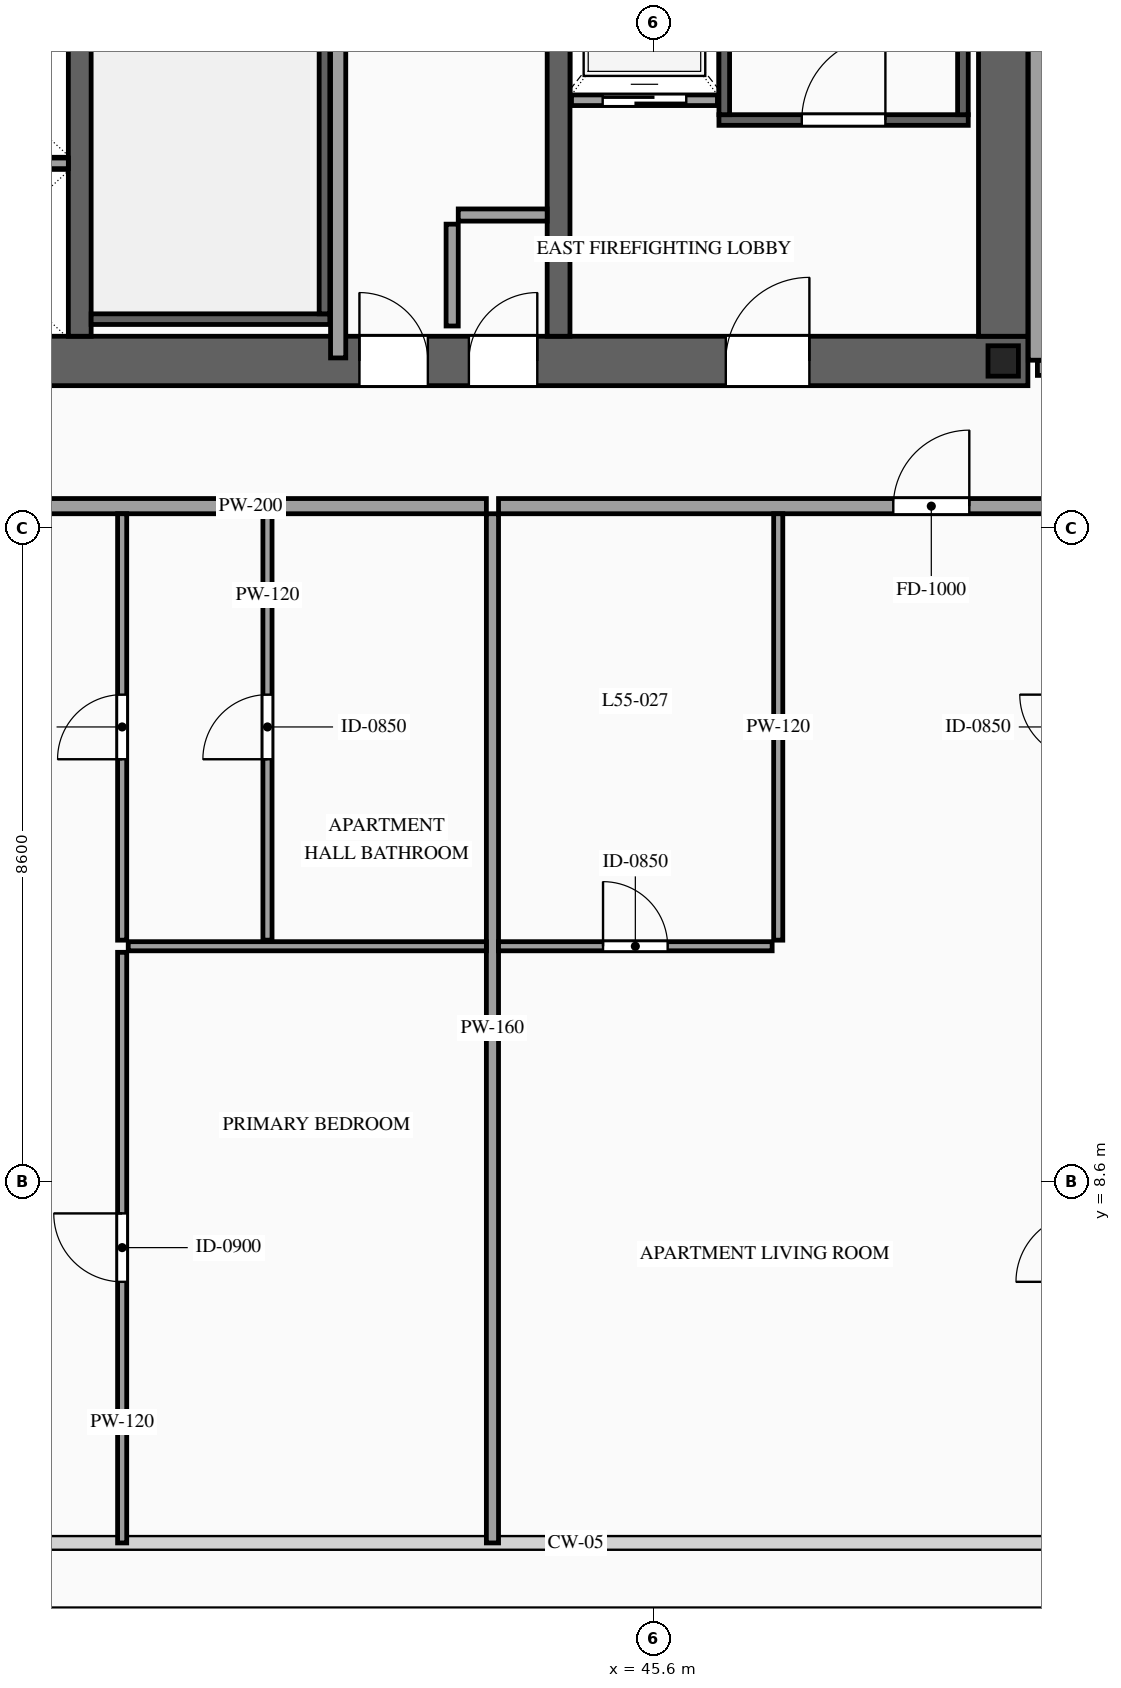
"""IFC4 building model, lengths in metres.
Left out: names, types, materials, properties, quantities, classifications, styles, units other than length and angle.
Written with IfcOpenShell. Run it as: python <this file> out.ifc"""

import sys

from ifc_helpers import new_model, si_unit, direction, frame, frame_2d, origin, origin_2d, place, context, subcontext, project, spatial, rectangle, i_section, extrude, source, transform, mapped, element, fill, save


model = new_model("IFC4")
c1 = context("Model", 3, precision=1e-05, world=origin(), true_north=direction((0.0, 1.0)))
c2 = subcontext(c1, "Body", "Model", "MODEL_VIEW")
j1 = project(units=[si_unit("LENGTHUNIT", "METRE"), si_unit("PLANEANGLEUNIT", "RADIAN")], contexts=[c1])
p1 = place(None, origin())
s1 = spatial("IfcSite", under=j1, at=p1, CompositionType="ELEMENT")
p2 = place(p1, origin())
s2 = spatial("IfcBuilding", under=s1, at=p2, CompositionType="ELEMENT")
p3 = place(p2, frame((0.0, 0.0, 209.0)))
s3 = spatial("IfcBuildingStorey", under=s2, at=p3, CompositionType="ELEMENT", Elevation=209.0)
p4 = place(p3, frame((23.475, 19.4, 0.0), z_axis=(0.0, 0.0, 1.0), x_axis=(1.0, 0.0, 0.0)))
e1 = element("IfcWall", 1, at=p4, inside=s3, PredefinedType="SHEAR", context=c2, shape_type="SweptSolid", body=[
    extrude(rectangle(XDim=27.05, YDim=0.65, at=frame_2d((13.525, 0.0))), origin(), (0.0, 0.0, 1.0), 3.5),
])
p5 = place(p4, frame((1.975, 0.0, 0.0)))
e2 = element("IfcOpeningElement", 2, at=p5, cuts=e1, PredefinedType="OPENING", context=c2, shape_type="SweptSolid", body=[
    extrude(rectangle(XDim=1.1, YDim=2.2, at=frame_2d((0.55, 1.1))), frame((0.0, 0.34, 0.0), z_axis=(0.0, -1.0, 0.0), x_axis=(1.0, 0.0, 0.0)), (0.0, 0.0, 1.0), 0.68),
])
p6 = place(p4, frame((9.875, 0.0, 0.0)))
e3 = element("IfcOpeningElement", 3, at=p6, cuts=e1, PredefinedType="OPENING", context=c2, shape_type="SweptSolid", body=[
    extrude(rectangle(XDim=1.1, YDim=2.2, at=frame_2d((0.55, 1.1))), frame((0.0, 0.34, 0.0), z_axis=(0.0, -1.0, 0.0), x_axis=(1.0, 0.0, 0.0)), (0.0, 0.0, 1.0), 0.68),
])
p7 = place(p4, frame((23.075, 0.0, 0.0)))
e4 = element("IfcOpeningElement", 4, at=p7, cuts=e1, PredefinedType="OPENING", context=c2, shape_type="SweptSolid", body=[
    extrude(rectangle(XDim=1.1, YDim=2.2, at=frame_2d((0.55, 1.1))), frame((0.0, 0.34, 0.0), z_axis=(0.0, -1.0, 0.0), x_axis=(1.0, 0.0, 0.0)), (0.0, 0.0, 1.0), 0.68),
])
p8 = place(p4, frame((19.695, 0.0, 0.0)))
e5 = element("IfcOpeningElement", 5, at=p8, cuts=e1, PredefinedType="OPENING", context=c2, shape_type="SweptSolid", body=[
    extrude(rectangle(XDim=0.9, YDim=2.15, at=frame_2d((0.45, 1.075))), frame((0.0, 0.34, 0.0), z_axis=(0.0, -1.0, 0.0), x_axis=(1.0, 0.0, 0.0)), (0.0, 0.0, 1.0), 0.68),
])
p9 = place(p4, frame((18.255, 0.0, 0.0)))
e6 = element("IfcOpeningElement", 6, at=p9, cuts=e1, PredefinedType="OPENING", context=c2, shape_type="SweptSolid", body=[
    extrude(rectangle(XDim=0.9, YDim=2.15, at=frame_2d((0.45, 1.075))), frame((0.0, 0.34, 0.0), z_axis=(0.0, -1.0, 0.0), x_axis=(1.0, 0.0, 0.0)), (0.0, 0.0, 1.0), 0.68),
])
m1 = source(origin(), c2, "Body", "SweptSolid", [
    extrude(rectangle(XDim=12.15, YDim=0.65, at=frame_2d((6.075, 0.0))), origin(), (0.0, 0.0, 1.0), 3.5),
])
p10 = place(p3, frame((50.2, 19.725, 0.0), z_axis=(0.0, 0.0, 1.0), x_axis=(0.0, 1.0, 0.0)))
e7 = element("IfcWall", 7, at=p10, inside=s3, PredefinedType="SHEAR", context=c2, shape_type="MappedRepresentation", body=[
    mapped(m1, transform((0.0, 0.0, 0.0), scale=1.0)),
])
m2 = source(origin(), c2, "Body", "SweptSolid", [
    extrude(rectangle(XDim=12.15, YDim=0.3, at=frame_2d((6.075, 0.0))), origin(), (0.0, 0.0, 1.0), 3.5),
])
for number, where, z_axis, x_axis in (
    (8, (38.05, 19.725, 0.0), (0.0, 0.0, 1.0), (0.0, 1.0, 0.0)),
    (9, (44.35, 19.725, 0.0), (0.0, 0.0, 1.0), (0.0, 1.0, 0.0)),
):
    element("IfcWall", number, at=place(p3, frame(where, z_axis=z_axis, x_axis=x_axis)), inside=s3, PredefinedType="SOLIDWALL", context=c2, shape_type="MappedRepresentation", body=[
        mapped(m2, transform((0.0, 0.0, 0.0), scale=1.0)),
    ])
m3 = source(origin(), c2, "Body", "SweptSolid", [
    extrude(i_section(OverallWidth=0.4, OverallDepth=0.4, WebThickness=0.013, FlangeThickness=0.021, at=origin_2d()), origin(), (0.0, 0.0, 1.0), 3.5),
])
p11 = place(p3, frame((50.2, 19.4, 0.0), z_axis=(0.0, 0.0, 1.0), x_axis=(1.0, 0.0, 0.0)))
e10 = element("IfcColumn", 10, at=p11, inside=s3, PredefinedType="COLUMN", context=c2, shape_type="MappedRepresentation", body=[
    mapped(m3, transform((0.0, 0.0, 0.0), scale=1.0)),
])
p12 = place(p3, frame((44.52, 22.83, 0.0), z_axis=(0.0, 0.0, 1.0), x_axis=(1.0, 0.0, 0.0)))
e11 = element("IfcWall", 11, at=p12, inside=s3, PredefinedType="SOLIDWALL", context=c2, shape_type="SweptSolid", body=[
    extrude(rectangle(XDim=1.92, YDim=0.14, at=frame_2d((0.96, 0.0))), origin(), (0.0, 0.0, 1.0), 3.28),
])
p13 = place(p12, frame((0.41, 0.0, 0.0)))
e12 = element("IfcOpeningElement", 12, at=p13, cuts=e11, PredefinedType="OPENING", context=c2, shape_type="SweptSolid", body=[
    extrude(rectangle(XDim=1.1, YDim=2.2, at=frame_2d((0.55, 1.1))), frame((0.0, 0.085, 0.0), z_axis=(0.0, -1.0, 0.0), x_axis=(1.0, 0.0, 0.0)), (0.0, 0.0, 1.0), 0.17),
])
m4 = source(origin(), c2, "Body", "SweptSolid", [
    extrude(rectangle(XDim=2.4, YDim=0.14, at=frame_2d((1.2, 0.0))), origin(), (0.0, 0.0, 1.0), 3.28),
])
p14 = place(p3, frame((35.5, 22.0, 0.0), z_axis=(0.0, 0.0, 1.0), x_axis=(1.0, 0.0, 0.0)))
e13 = element("IfcWall", 13, at=p14, inside=s3, PredefinedType="SOLIDWALL", context=c2, shape_type="MappedRepresentation", body=[
    mapped(m4, transform((0.0, 0.0, 0.0), scale=1.0)),
])
p15 = place(p3, frame((46.46, 22.57, 0.0), z_axis=(0.0, 0.0, 1.0), x_axis=(1.0, 0.0, 0.0)))
e14 = element("IfcWall", 14, at=p15, inside=s3, PredefinedType="SOLIDWALL", context=c2, shape_type="SweptSolid", body=[
    extrude(rectangle(XDim=3.28, YDim=0.14, at=frame_2d((1.64, 0.0))), origin(), (0.0, 0.0, 1.0), 3.28),
])
p16 = place(p15, frame((1.09, 0.0, 0.0)))
e15 = element("IfcOpeningElement", 15, at=p16, cuts=e14, PredefinedType="OPENING", context=c2, shape_type="SweptSolid", body=[
    extrude(rectangle(XDim=1.1, YDim=2.2, at=frame_2d((0.55, 1.1))), frame((0.0, 0.085, 0.0), z_axis=(0.0, -1.0, 0.0), x_axis=(1.0, 0.0, 0.0)), (0.0, 0.0, 1.0), 0.17),
])
m5 = source(origin(), c2, "Body", "SweptSolid", [
    extrude(rectangle(XDim=8.94, YDim=0.14, at=frame_2d((4.47, 0.0))), origin(), (0.0, 0.0, 1.0), 3.28),
])
for number, where, z_axis, x_axis in (
    (16, (46.53, 22.64, 0.0), (0.0, 0.0, 1.0), (0.0, 1.0, 0.0)),
    (17, (49.67, 22.64, 0.0), (0.0, 0.0, 1.0), (0.0, 1.0, 0.0)),
):
    element("IfcWall", number, at=place(p3, frame(where, z_axis=z_axis, x_axis=x_axis)), inside=s3, PredefinedType="SOLIDWALL", context=c2, shape_type="MappedRepresentation", body=[
        mapped(m5, transform((0.0, 0.0, 0.0), scale=1.0)),
    ])
m6 = source(origin(), c2, "Body", "SweptSolid", [
    extrude(rectangle(XDim=3.14, YDim=0.14, at=frame_2d((1.57, 0.0))), origin(), (0.0, 0.0, 1.0), 3.28),
])
p17 = place(p3, frame((38.2, 19.95, 0.0), z_axis=(0.0, 0.0, 1.0), x_axis=(1.0, 0.0, 0.0)))
e18 = element("IfcWall", 18, at=p17, inside=s3, PredefinedType="SOLIDWALL", context=c2, shape_type="MappedRepresentation", body=[
    mapped(m6, transform((0.0, 0.0, 0.0), scale=1.0)),
])
m7 = source(origin(), c2, "Body", "SweptSolid", [
    extrude(rectangle(XDim=8.94, YDim=0.14, at=frame_2d((4.47, 0.0))), origin(), (0.0, 0.0, 1.0), 3.28),
])
p18 = place(p3, frame((41.27, 20.02, 0.0), z_axis=(0.0, 0.0, 1.0), x_axis=(0.0, 1.0, 0.0)))
e19 = element("IfcWall", 19, at=p18, inside=s3, PredefinedType="SOLIDWALL", context=c2, shape_type="MappedRepresentation", body=[
    mapped(m7, transform((0.0, 0.0, 0.0), scale=1.0)),
])
m8 = source(origin(), c2, "Body", "SweptSolid", [
    extrude(rectangle(XDim=1.34, YDim=0.16, at=frame_2d((0.67, 0.0))), origin(), (0.0, 0.0, 1.0), 3.28),
])
p19 = place(p3, frame((42.95, 19.86, 0.0), z_axis=(0.0, 0.0, 1.0), x_axis=(0.0, 1.0, 0.0)))
e20 = element("IfcWall", 20, at=p19, inside=s3, PredefinedType="PARTITIONING", context=c2, shape_type="MappedRepresentation", body=[
    mapped(m8, transform((0.0, 0.0, 0.0), scale=1.0)),
])
m9 = source(origin(), c2, "Body", "SweptSolid", [
    extrude(rectangle(XDim=1.17, YDim=0.16, at=frame_2d((0.585, 0.0))), origin(), (0.0, 0.0, 1.0), 3.28),
])
p20 = place(p3, frame((43.03, 21.32, 0.0), z_axis=(0.0, 0.0, 1.0), x_axis=(1.0, 0.0, 0.0)))
e21 = element("IfcWall", 21, at=p20, inside=s3, PredefinedType="PARTITIONING", context=c2, shape_type="MappedRepresentation", body=[
    mapped(m9, transform((0.0, 0.0, 0.0), scale=1.0)),
])
m10 = source(origin(), c2, "Body", "SweptSolid", [
    extrude(rectangle(XDim=12.72, YDim=0.2, at=frame_2d((6.36, 0.0))), origin(), (0.0, 0.0, 1.0), 3.28),
])
p21 = place(p3, frame((41.45, 19.44, 0.0), z_axis=(0.0, 0.0, 1.0), x_axis=(0.0, 1.0, 0.0)))
e22 = element("IfcWall", 22, at=p21, inside=s3, PredefinedType="PARTITIONING", context=c2, shape_type="MappedRepresentation", body=[
    mapped(m10, transform((0.0, 0.0, 0.0), scale=1.0)),
])
p22 = place(p3, frame((30.6, 17.49, 0.0), z_axis=(0.0, 0.0, 1.0), x_axis=(1.0, 0.0, 0.0)))
e23 = element("IfcWall", 23, at=p22, inside=s3, PredefinedType="PARTITIONING", context=c2, shape_type="SweptSolid", body=[
    extrude(rectangle(XDim=12.8, YDim=0.2, at=frame_2d((6.4, 0.0))), origin(), (0.0, 0.0, 1.0), 3.28),
])
p23 = place(p22, frame((5.344, 0.0, 0.0)))
e24 = element("IfcOpeningElement", 24, at=p23, cuts=e23, PredefinedType="OPENING", context=c2, shape_type="SweptSolid", body=[
    extrude(rectangle(XDim=1.0, YDim=2.2, at=frame_2d((0.5, 1.1))), frame((0.0, 0.115, 0.0), z_axis=(0.0, -1.0, 0.0), x_axis=(1.0, 0.0, 0.0)), (0.0, 0.0, 1.0), 0.23),
])
m11 = source(origin(), c2, "Body", "SweptSolid", [
    extrude(rectangle(XDim=13.54, YDim=0.16, at=frame_2d((6.77, 0.0))), origin(), (0.0, 0.0, 1.0), 3.28),
])
p24 = place(p3, frame((43.48, 3.85, 0.0), z_axis=(0.0, 0.0, 1.0), x_axis=(0.0, 1.0, 0.0)))
e25 = element("IfcWall", 25, at=p24, inside=s3, PredefinedType="PARTITIONING", context=c2, shape_type="MappedRepresentation", body=[
    mapped(m11, transform((0.0, 0.0, 0.0), scale=1.0)),
])
p25 = place(p3, frame((40.52, 11.78, 0.0), z_axis=(0.0, 0.0, 1.0), x_axis=(0.0, 1.0, 0.0)))
e26 = element("IfcWall", 26, at=p25, inside=s3, PredefinedType="PARTITIONING", context=c2, shape_type="SweptSolid", body=[
    extrude(rectangle(XDim=5.61, YDim=0.12, at=frame_2d((2.805, 0.0))), origin(), (0.0, 0.0, 1.0), 3.28),
])
p26 = place(p25, frame((2.38, 0.0, 0.0)))
e27 = element("IfcOpeningElement", 27, at=p26, cuts=e26, PredefinedType="OPENING", context=c2, shape_type="SweptSolid", body=[
    extrude(rectangle(XDim=0.85, YDim=2.1, at=frame_2d((0.425, 1.05))), frame((0.0, 0.075, 0.0), z_axis=(0.0, -1.0, 0.0), x_axis=(1.0, 0.0, 0.0)), (0.0, 0.0, 1.0), 0.15),
])
m12 = source(origin(), c2, "Body", "SweptSolid", [
    extrude(rectangle(XDim=4.712, YDim=0.12, at=frame_2d((2.356, 0.0))), origin(), (0.0, 0.0, 1.0), 2.875),
])
p27 = place(p3, frame((38.688, 11.7, 0.0), z_axis=(0.0, 0.0, 1.0), x_axis=(1.0, 0.0, 0.0)))
e28 = element("IfcWall", 28, at=p27, inside=s3, PredefinedType="PARTITIONING", context=c2, shape_type="MappedRepresentation", body=[
    mapped(m12, transform((0.0, 0.0, 0.0), scale=1.0)),
])
p28 = place(p3, frame((38.608, 3.85, 0.0), z_axis=(0.0, 0.0, 1.0), x_axis=(0.0, 1.0, 0.0)))
e29 = element("IfcWall", 29, at=p28, inside=s3, PredefinedType="PARTITIONING", context=c2, shape_type="SweptSolid", body=[
    extrude(rectangle(XDim=7.77, YDim=0.12, at=frame_2d((3.885, 0.0))), origin(), (0.0, 0.0, 1.0), 3.28),
])
p29 = place(p28, frame((3.435, 0.0, 0.0)))
e30 = element("IfcOpeningElement", 30, at=p29, cuts=e29, PredefinedType="OPENING", context=c2, shape_type="SweptSolid", body=[
    extrude(rectangle(XDim=0.9, YDim=2.15, at=frame_2d((0.45, 1.075))), frame((0.0, 0.075, 0.0), z_axis=(0.0, -1.0, 0.0), x_axis=(1.0, 0.0, 0.0)), (0.0, 0.0, 1.0), 0.15),
])
p30 = place(p3, frame((38.608, 11.78, 0.0), z_axis=(0.0, 0.0, 1.0), x_axis=(0.0, 1.0, 0.0)))
e31 = element("IfcWall", 31, at=p30, inside=s3, PredefinedType="PARTITIONING", context=c2, shape_type="SweptSolid", body=[
    extrude(rectangle(XDim=5.61, YDim=0.12, at=frame_2d((2.805, 0.0))), origin(), (0.0, 0.0, 1.0), 3.28),
])
p31 = place(p30, frame((2.38, 0.0, 0.0)))
e32 = element("IfcOpeningElement", 32, at=p31, cuts=e31, PredefinedType="OPENING", context=c2, shape_type="SweptSolid", body=[
    extrude(rectangle(XDim=0.85, YDim=2.1, at=frame_2d((0.425, 1.05))), frame((0.0, 0.075, 0.0), z_axis=(0.0, -1.0, 0.0), x_axis=(1.0, 0.0, 0.0)), (0.0, 0.0, 1.0), 0.15),
])
p32 = place(p3, frame((43.56, 17.49, 0.0), z_axis=(0.0, 0.0, 1.0), x_axis=(1.0, 0.0, 0.0)))
e33 = element("IfcWall", 33, at=p32, inside=s3, PredefinedType="PARTITIONING", context=c2, shape_type="SweptSolid", body=[
    extrude(rectangle(XDim=12.5, YDim=0.2, at=frame_2d((6.25, 0.0))), origin(), (0.0, 0.0, 1.0), 3.28),
])
p33 = place(p32, frame((5.194, 0.0, 0.0)))
e34 = element("IfcOpeningElement", 34, at=p33, cuts=e33, PredefinedType="OPENING", context=c2, shape_type="SweptSolid", body=[
    extrude(rectangle(XDim=1.0, YDim=2.2, at=frame_2d((0.5, 1.1))), frame((0.0, 0.115, 0.0), z_axis=(0.0, -1.0, 0.0), x_axis=(1.0, 0.0, 0.0)), (0.0, 0.0, 1.0), 0.23),
])
p34 = place(p3, frame((43.56, 11.7, 0.0), z_axis=(0.0, 0.0, 1.0), x_axis=(1.0, 0.0, 0.0)))
e35 = element("IfcWall", 35, at=p34, inside=s3, PredefinedType="PARTITIONING", context=c2, shape_type="SweptSolid", body=[
    extrude(rectangle(XDim=3.6, YDim=0.12, at=frame_2d((1.8, 0.0))), origin(), (0.0, 0.0, 1.0), 2.875),
])
p35 = place(p34, frame((1.375, 0.0, 0.0)))
e36 = element("IfcOpeningElement", 36, at=p35, cuts=e35, PredefinedType="OPENING", context=c2, shape_type="SweptSolid", body=[
    extrude(rectangle(XDim=0.85, YDim=2.1, at=frame_2d((0.425, 1.05))), frame((0.0, 0.075, 0.0), z_axis=(0.0, -1.0, 0.0), x_axis=(1.0, 0.0, 0.0)), (0.0, 0.0, 1.0), 0.15),
])
m13 = source(origin(), c2, "Body", "SweptSolid", [
    extrude(rectangle(XDim=5.61, YDim=0.12, at=frame_2d((2.805, 0.0))), origin(), (0.0, 0.0, 1.0), 3.28),
])
p36 = place(p3, frame((47.24, 11.78, 0.0), z_axis=(0.0, 0.0, 1.0), x_axis=(0.0, 1.0, 0.0)))
e37 = element("IfcWall", 37, at=p36, inside=s3, PredefinedType="PARTITIONING", context=c2, shape_type="MappedRepresentation", body=[
    mapped(m13, transform((0.0, 0.0, 0.0), scale=1.0)),
])
p37 = place(p3, frame((50.65, 19.31, 0.0), z_axis=(0.0, 0.0, 1.0), x_axis=(1.0, 0.0, 0.0)))
e38 = element("IfcWall", 38, at=p37, inside=s3, PredefinedType="PARTITIONING", context=c2, shape_type="SweptSolid", body=[
    extrude(rectangle(XDim=8.3, YDim=0.2, at=frame_2d((4.15, 0.0))), origin(), (0.0, 0.0, 1.0), 2.775),
])
p38 = place(p37, frame((3.585, 0.0, 0.0)))
e39 = element("IfcOpeningElement", 39, at=p38, cuts=e38, PredefinedType="OPENING", context=c2, shape_type="SweptSolid", body=[
    extrude(rectangle(XDim=1.0, YDim=2.2, at=frame_2d((0.5, 1.1))), frame((0.0, 0.115, 0.0), z_axis=(0.0, -1.0, 0.0), x_axis=(1.0, 0.0, 0.0)), (0.0, 0.0, 1.0), 0.23),
])
m14 = source(origin(), c2, "Body", "SweptSolid", [
    extrude(rectangle(XDim=6.29, YDim=0.2, at=frame_2d((3.145, 0.0))), origin(), (0.0, 0.0, 1.0), 3.28),
])
p39 = place(p3, frame((50.63, 19.41, 0.0), z_axis=(0.0, 0.0, 1.0), x_axis=(0.0, 1.0, 0.0)))
e40 = element("IfcWall", 40, at=p39, inside=s3, PredefinedType="PARTITIONING", context=c2, shape_type="MappedRepresentation", body=[
    mapped(m14, transform((0.0, 0.0, 0.0), scale=1.0)),
])
m15 = source(origin(), c2, "Body", "SweptSolid", [
    extrude(rectangle(XDim=1.1, YDim=2.2, at=frame_2d((0.55, 1.1))), frame((0.0, 0.025, 0.0), z_axis=(0.0, -1.0, 0.0), x_axis=(1.0, 0.0, 0.0)), (0.0, 0.0, 1.0), 0.05),
])
p40 = place(p13, origin())
e41 = element("IfcDoor", 41, at=p40, inside=s3, OperationType="SLIDING_TO_RIGHT", PredefinedType="DOOR", context=c2, shape_type="MappedRepresentation", body=[
    mapped(m15, transform((0.0, 0.0, 0.0), scale=1.0)),
])
fill(e12, e41)
m16 = source(origin(), c2, "Body", "SweptSolid", [
    extrude(rectangle(XDim=1.1, YDim=2.2, at=frame_2d((0.55, 1.1))), frame((0.0, 0.025, 0.0), z_axis=(0.0, -1.0, 0.0), x_axis=(1.0, 0.0, 0.0)), (0.0, 0.0, 1.0), 0.05),
])
p41 = place(p16, origin())
e42 = element("IfcDoor", 42, at=p41, inside=s3, OperationType="SINGLE_SWING_RIGHT", PredefinedType="DOOR", context=c2, shape_type="MappedRepresentation", body=[
    mapped(m16, transform((0.0, 0.0, 0.0), scale=1.0)),
])
fill(e15, e42)
p42 = place(p7, origin())
e43 = element("IfcDoor", 43, at=p42, inside=s3, OperationType="SINGLE_SWING_RIGHT", PredefinedType="DOOR", context=c2, shape_type="MappedRepresentation", body=[
    mapped(m16, transform((0.0, 0.0, 0.0), scale=1.0)),
])
fill(e4, e43)
m17 = source(origin(), c2, "Body", "SweptSolid", [
    extrude(rectangle(XDim=0.9, YDim=2.15, at=frame_2d((0.45, 1.075))), frame((0.0, 0.025, 0.0), z_axis=(0.0, -1.0, 0.0), x_axis=(1.0, 0.0, 0.0)), (0.0, 0.0, 1.0), 0.05),
])
p43 = place(p8, origin())
e44 = element("IfcDoor", 44, at=p43, inside=s3, OperationType="SINGLE_SWING_RIGHT", PredefinedType="DOOR", context=c2, shape_type="MappedRepresentation", body=[
    mapped(m17, transform((0.0, 0.0, 0.0), scale=1.0)),
])
fill(e5, e44)
p44 = place(p9, origin())
e45 = element("IfcDoor", 45, at=p44, inside=s3, OperationType="SINGLE_SWING_LEFT", PredefinedType="DOOR", context=c2, shape_type="MappedRepresentation", body=[
    mapped(m17, transform((0.0, 0.0, 0.0), scale=1.0)),
])
fill(e6, e45)
m18 = source(origin(), c2, "Body", "SweptSolid", [
    extrude(rectangle(XDim=0.85, YDim=2.1, at=frame_2d((0.425, 1.05))), frame((0.0, 0.025, 0.0), z_axis=(0.0, -1.0, 0.0), x_axis=(1.0, 0.0, 0.0)), (0.0, 0.0, 1.0), 0.05),
])
p45 = place(p26, origin())
e46 = element("IfcDoor", 46, at=p45, inside=s3, OperationType="SINGLE_SWING_LEFT", PredefinedType="DOOR", context=c2, shape_type="MappedRepresentation", body=[
    mapped(m18, transform((0.0, 0.0, 0.0), scale=1.0)),
])
fill(e27, e46)
m19 = source(origin(), c2, "Body", "SweptSolid", [
    extrude(rectangle(XDim=0.9, YDim=2.15, at=frame_2d((0.45, 1.075))), frame((0.0, 0.025, 0.0), z_axis=(0.0, -1.0, 0.0), x_axis=(1.0, 0.0, 0.0)), (0.0, 0.0, 1.0), 0.05),
])
p46 = place(p29, origin())
e47 = element("IfcDoor", 47, at=p46, inside=s3, OperationType="SINGLE_SWING_RIGHT", PredefinedType="DOOR", context=c2, shape_type="MappedRepresentation", body=[
    mapped(m19, transform((0.0, 0.0, 0.0), scale=1.0)),
])
fill(e30, e47)
p47 = place(p31, origin())
e48 = element("IfcDoor", 48, at=p47, inside=s3, OperationType="SINGLE_SWING_LEFT", PredefinedType="DOOR", context=c2, shape_type="MappedRepresentation", body=[
    mapped(m18, transform((0.0, 0.0, 0.0), scale=1.0)),
])
fill(e32, e48)
m20 = source(origin(), c2, "Body", "SweptSolid", [
    extrude(rectangle(XDim=1.0, YDim=2.2, at=frame_2d((0.5, 1.1))), frame((0.0, 0.025, 0.0), z_axis=(0.0, -1.0, 0.0), x_axis=(1.0, 0.0, 0.0)), (0.0, 0.0, 1.0), 0.05),
])
p48 = place(p33, origin())
e49 = element("IfcDoor", 49, at=p48, inside=s3, OperationType="SINGLE_SWING_RIGHT", PredefinedType="DOOR", context=c2, shape_type="MappedRepresentation", body=[
    mapped(m20, transform((0.0, 0.0, 0.0), scale=1.0)),
])
fill(e34, e49)
p49 = place(p35, origin())
e50 = element("IfcDoor", 50, at=p49, inside=s3, OperationType="SINGLE_SWING_LEFT", PredefinedType="DOOR", context=c2, shape_type="MappedRepresentation", body=[
    mapped(m18, transform((0.0, 0.0, 0.0), scale=1.0)),
])
fill(e36, e50)
save(model, sys.argv[1])
